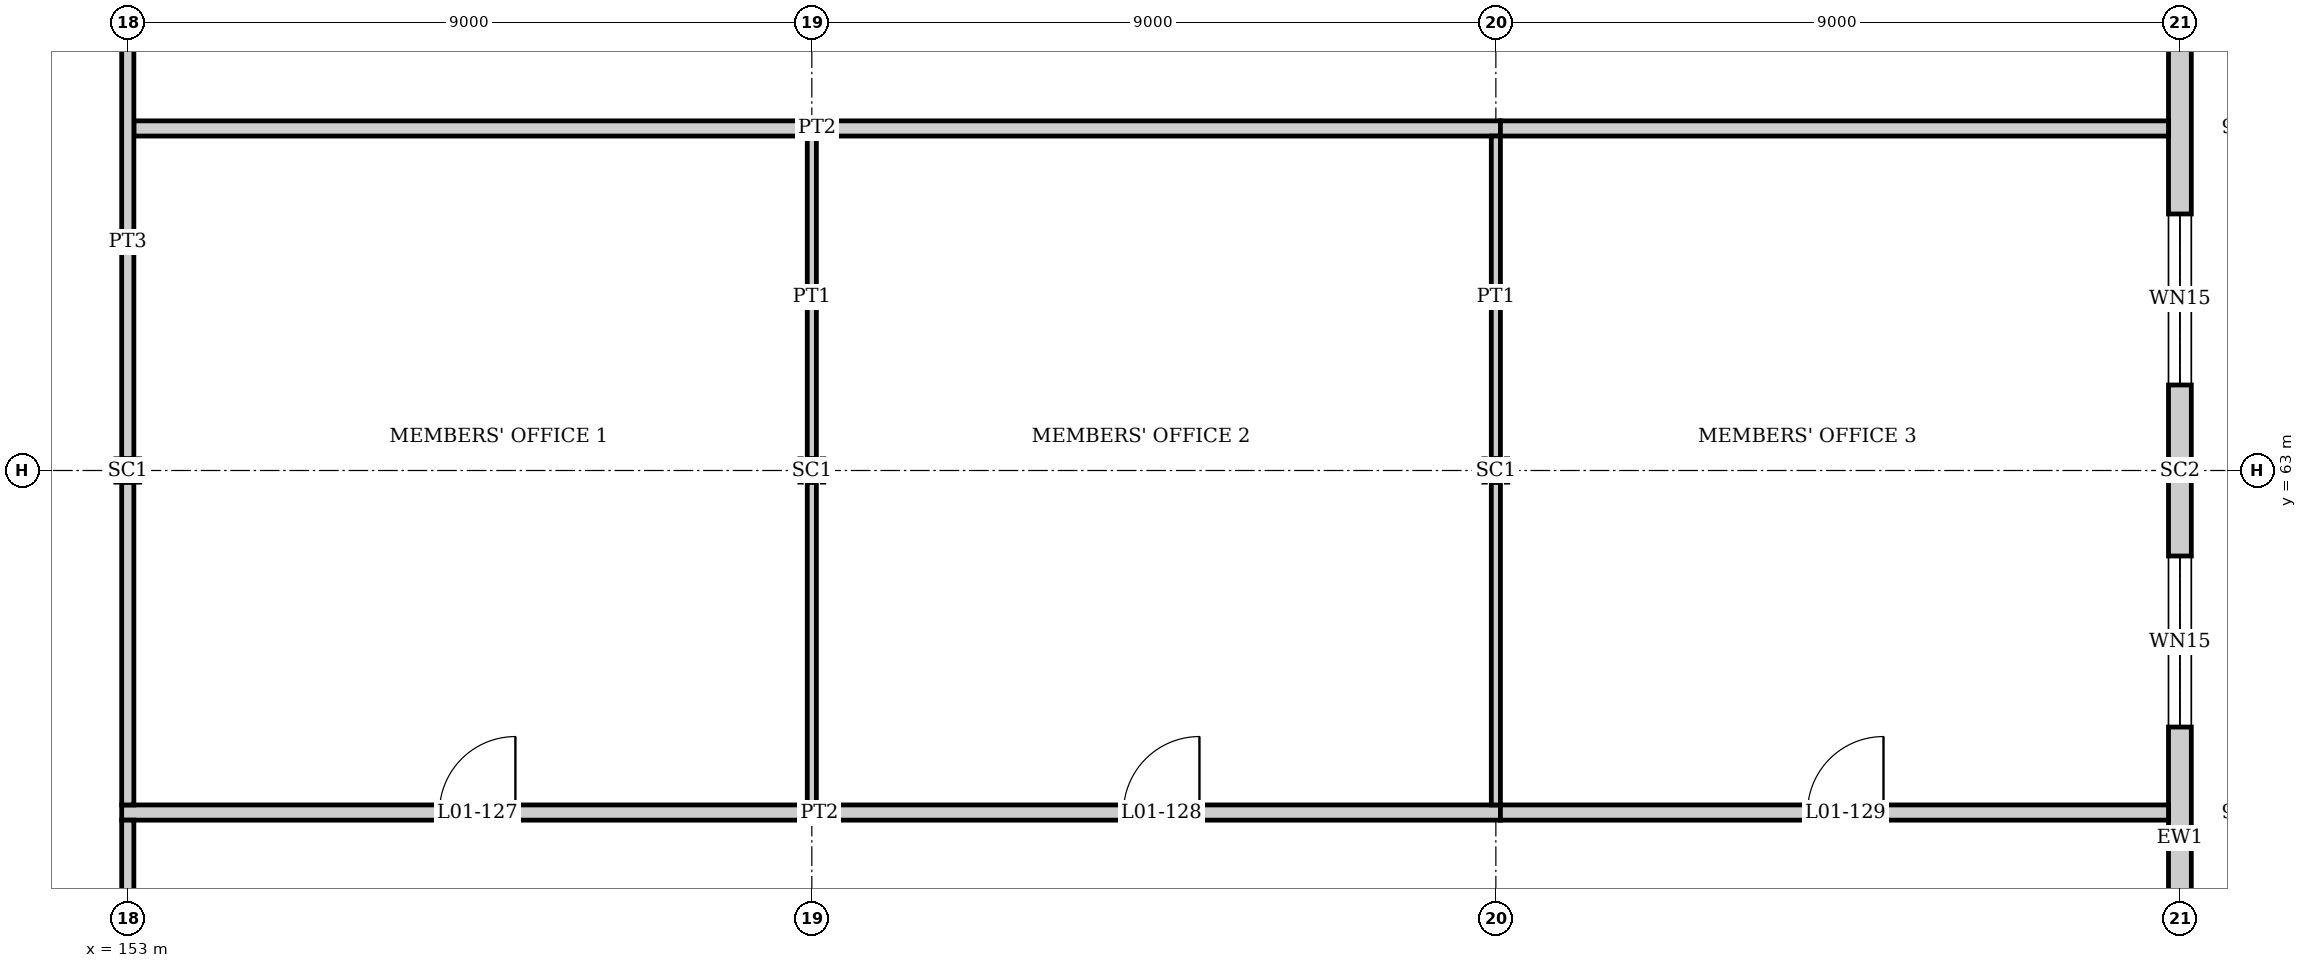
"""IFC4 building model, lengths in metres.
Left out: names, types, materials, properties, quantities, classifications, styles, units other than length and angle.
Written with IfcOpenShell. Run it as: python <this file> out.ifc"""

import sys

from ifc_helpers import new_model, si_unit, direction, frame, frame_2d, origin, origin_2d, place, context, subcontext, project, spatial, rectangle, i_section, extrude, element, fill, save


model = new_model("IFC4")
c1 = context("Model", 3, precision=1e-05, world=origin(), true_north=direction((0.0, 1.0)))
c2 = subcontext(c1, "Body", "Model", "MODEL_VIEW")
j1 = project(units=[si_unit("LENGTHUNIT", "METRE"), si_unit("PLANEANGLEUNIT", "RADIAN")], contexts=[c1])
p1 = place(None, origin())
s1 = spatial("IfcSite", under=j1, at=p1, CompositionType="ELEMENT")
p2 = place(p1, origin())
s2 = spatial("IfcBuilding", under=s1, at=p2, CompositionType="ELEMENT")
p3 = place(p2, frame((0.0, 0.0, 6.0)))
s3 = spatial("IfcBuildingStorey", under=s2, at=p3, CompositionType="ELEMENT", Elevation=6.0)
for number, where, z_axis, x_axis in (
    (1, (153.0, 63.0, 0.0), (0.0, 0.0, 1.0), (0.0, 1.0, 0.0)),
    (2, (162.0, 63.0, 0.0), (0.0, 0.0, 1.0), (0.0, 1.0, 0.0)),
    (3, (171.0, 63.0, 0.0), (0.0, 0.0, 1.0), (0.0, 1.0, 0.0)),
):
    element("IfcColumn", number, at=place(p3, frame(where, z_axis=z_axis, x_axis=x_axis)), inside=s3, PredefinedType="COLUMN", context=c2, shape_type="SweptSolid", body=[
        extrude(i_section(OverallWidth=0.307, OverallDepth=0.315, WebThickness=0.012, FlangeThickness=0.019, at=origin_2d()), origin(), (0.0, 0.0, 1.0), 4.5),
    ])
p4 = place(p3, frame((180.0, 63.0, 0.0), z_axis=(0.0, 0.0, 1.0), x_axis=(0.0, 1.0, 0.0)))
e4 = element("IfcColumn", 4, at=p4, inside=s3, PredefinedType="COLUMN", context=c2, shape_type="SweptSolid", body=[
    extrude(i_section(OverallWidth=0.256, OverallDepth=0.26, WebThickness=0.01, FlangeThickness=0.017, at=origin_2d()), origin(), (0.0, 0.0, 1.0), 4.5),
])
p5 = place(p3, frame((180.0, 54.0, 0.0), z_axis=(0.0, 0.0, 1.0), x_axis=(0.0, 1.0, 0.0)))
e5 = element("IfcWall", 5, at=p5, inside=s3, PredefinedType="SOLIDWALL", context=c2, shape_type="SweptSolid", body=[
    extrude(rectangle(XDim=8.872, YDim=0.3, at=frame_2d((4.436, 0.0))), origin(), (0.0, 0.0, 1.0), 3.947),
])
p6 = place(p5, frame((1.8, 0.0, 0.6)))
e6 = element("IfcOpeningElement", 6, at=p6, cuts=e5, PredefinedType="OPENING", context=c2, shape_type="SweptSolid", body=[
    extrude(rectangle(XDim=0.9, YDim=2.7, at=frame_2d((0.45, 1.35))), frame((0.0, 0.16, 0.0), z_axis=(0.0, -1.0, 0.0), x_axis=(1.0, 0.0, 0.0)), (0.0, 0.0, 1.0), 0.32),
])
p7 = place(p5, frame((5.625, 0.0, 0.9)))
e7 = element("IfcOpeningElement", 7, at=p7, cuts=e5, PredefinedType="OPENING", context=c2, shape_type="SweptSolid", body=[
    extrude(rectangle(XDim=2.25, YDim=1.8, at=frame_2d((1.125, 0.9))), frame((0.0, 0.16, 0.0), z_axis=(0.0, -1.0, 0.0), x_axis=(1.0, 0.0, 0.0)), (0.0, 0.0, 1.0), 0.32),
])
p8 = place(p3, frame((180.0, 63.128, 0.0), z_axis=(0.0, 0.0, 1.0), x_axis=(0.0, 1.0, 0.0)))
e8 = element("IfcWall", 8, at=p8, inside=s3, PredefinedType="SOLIDWALL", context=c2, shape_type="SweptSolid", body=[
    extrude(rectangle(XDim=8.872, YDim=0.3, at=frame_2d((4.436, 0.0))), origin(), (0.0, 0.0, 1.0), 3.947),
])
p9 = place(p8, frame((0.997, 0.0, 0.9)))
e9 = element("IfcOpeningElement", 9, at=p9, cuts=e8, PredefinedType="OPENING", context=c2, shape_type="SweptSolid", body=[
    extrude(rectangle(XDim=2.25, YDim=1.8, at=frame_2d((1.125, 0.9))), frame((0.0, 0.16, 0.0), z_axis=(0.0, -1.0, 0.0), x_axis=(1.0, 0.0, 0.0)), (0.0, 0.0, 1.0), 0.32),
])
p10 = place(p8, frame((6.172, 0.0, 0.6)))
e10 = element("IfcOpeningElement", 10, at=p10, cuts=e8, PredefinedType="OPENING", context=c2, shape_type="SweptSolid", body=[
    extrude(rectangle(XDim=0.9, YDim=2.7, at=frame_2d((0.45, 1.35))), frame((0.0, 0.16, 0.0), z_axis=(0.0, -1.0, 0.0), x_axis=(1.0, 0.0, 0.0)), (0.0, 0.0, 1.0), 0.32),
])
p11 = place(p3, frame((152.92, 58.5, 0.0), z_axis=(0.0, 0.0, 1.0), x_axis=(1.0, 0.0, 0.0)))
e11 = element("IfcWall", 11, at=p11, inside=s3, PredefinedType="PARTITIONING", context=c2, shape_type="SweptSolid", body=[
    extrude(rectangle(XDim=18.14, YDim=0.2, at=frame_2d((9.07, 0.0))), origin(), (0.0, 0.0, 1.0), 3.947),
])
p12 = place(p11, frame((4.18, 0.0, 0.0)))
e12 = element("IfcOpeningElement", 12, at=p12, cuts=e11, PredefinedType="OPENING", context=c2, shape_type="SweptSolid", body=[
    extrude(rectangle(XDim=1.0, YDim=2.1, at=frame_2d((0.5, 1.05))), frame((0.0, 0.11, 0.0), z_axis=(0.0, -1.0, 0.0), x_axis=(1.0, 0.0, 0.0)), (0.0, 0.0, 1.0), 0.22),
])
p13 = place(p11, frame((13.18, 0.0, 0.0)))
e13 = element("IfcOpeningElement", 13, at=p13, cuts=e11, PredefinedType="OPENING", context=c2, shape_type="SweptSolid", body=[
    extrude(rectangle(XDim=1.0, YDim=2.1, at=frame_2d((0.5, 1.05))), frame((0.0, 0.11, 0.0), z_axis=(0.0, -1.0, 0.0), x_axis=(1.0, 0.0, 0.0)), (0.0, 0.0, 1.0), 0.22),
])
p14 = place(p3, frame((171.06, 58.5, 0.0), z_axis=(0.0, 0.0, 1.0), x_axis=(1.0, 0.0, 0.0)))
e14 = element("IfcWall", 14, at=p14, inside=s3, PredefinedType="PARTITIONING", context=c2, shape_type="SweptSolid", body=[
    extrude(rectangle(XDim=8.79, YDim=0.2, at=frame_2d((4.395, 0.0))), origin(), (0.0, 0.0, 1.0), 3.994),
])
p15 = place(p14, frame((4.04, 0.0, 0.0)))
e15 = element("IfcOpeningElement", 15, at=p15, cuts=e14, PredefinedType="OPENING", context=c2, shape_type="SweptSolid", body=[
    extrude(rectangle(XDim=1.0, YDim=2.1, at=frame_2d((0.5, 1.05))), frame((0.0, 0.11, 0.0), z_axis=(0.0, -1.0, 0.0), x_axis=(1.0, 0.0, 0.0)), (0.0, 0.0, 1.0), 0.22),
])
p16 = place(p3, frame((153.08, 67.5, 0.0), z_axis=(0.0, 0.0, 1.0), x_axis=(1.0, 0.0, 0.0)))
e16 = element("IfcWall", 16, at=p16, inside=s3, PredefinedType="PARTITIONING", context=c2, shape_type="SweptSolid", body=[
    extrude(rectangle(XDim=17.98, YDim=0.2, at=frame_2d((8.99, 0.0))), origin(), (0.0, 0.0, 1.0), 3.947),
])
p17 = place(p3, frame((171.06, 67.5, 0.0), z_axis=(0.0, 0.0, 1.0), x_axis=(1.0, 0.0, 0.0)))
e17 = element("IfcWall", 17, at=p17, inside=s3, PredefinedType="PARTITIONING", context=c2, shape_type="SweptSolid", body=[
    extrude(rectangle(XDim=8.79, YDim=0.2, at=frame_2d((4.395, 0.0))), origin(), (0.0, 0.0, 1.0), 3.994),
])
p18 = place(p3, frame((153.0, 54.0, 0.0), z_axis=(0.0, 0.0, 1.0), x_axis=(0.0, 1.0, 0.0)))
e18 = element("IfcWall", 18, at=p18, inside=s3, PredefinedType="PARTITIONING", context=c2, shape_type="SweptSolid", body=[
    extrude(rectangle(XDim=4.4, YDim=0.16, at=frame_2d((2.2, 0.0))), origin(), (0.0, 0.0, 1.0), 3.822),
])
p19 = place(p18, frame((1.35, 0.0, 0.0)))
e19 = element("IfcOpeningElement", 19, at=p19, cuts=e18, PredefinedType="OPENING", context=c2, shape_type="SweptSolid", body=[
    extrude(rectangle(XDim=1.8, YDim=2.1, at=frame_2d((0.9, 1.05))), frame((0.0, 0.09, 0.0), z_axis=(0.0, -1.0, 0.0), x_axis=(1.0, 0.0, 0.0)), (0.0, 0.0, 1.0), 0.18),
])
p20 = place(p3, frame((153.0, 58.6, 0.0), z_axis=(0.0, 0.0, 1.0), x_axis=(0.0, 1.0, 0.0)))
e20 = element("IfcWall", 20, at=p20, inside=s3, PredefinedType="PARTITIONING", context=c2, shape_type="SweptSolid", body=[
    extrude(rectangle(XDim=4.242, YDim=0.16, at=frame_2d((2.121, 0.0))), origin(), (0.0, 0.0, 1.0), 3.994),
])
p21 = place(p3, frame((153.0, 63.157, 0.0), z_axis=(0.0, 0.0, 1.0), x_axis=(0.0, 1.0, 0.0)))
e21 = element("IfcWall", 21, at=p21, inside=s3, PredefinedType="PARTITIONING", context=c2, shape_type="SweptSolid", body=[
    extrude(rectangle(XDim=8.685, YDim=0.16, at=frame_2d((4.343, 0.0))), origin(), (0.0, 0.0, 1.0), 3.947),
])
p22 = place(p21, frame((5.692, 0.0, 0.0)))
e22 = element("IfcOpeningElement", 22, at=p22, cuts=e21, PredefinedType="OPENING", context=c2, shape_type="SweptSolid", body=[
    extrude(rectangle(XDim=1.8, YDim=2.1, at=frame_2d((0.9, 1.05))), frame((0.0, 0.09, 0.0), z_axis=(0.0, -1.0, 0.0), x_axis=(1.0, 0.0, 0.0)), (0.0, 0.0, 1.0), 0.18),
])
for number, where, z_axis, x_axis in (
    (23, (162.0, 58.6, 0.0), (0.0, 0.0, 1.0), (0.0, 1.0, 0.0)),
    (24, (162.0, 63.157, 0.0), (0.0, 0.0, 1.0), (0.0, 1.0, 0.0)),
):
    element("IfcWall", number, at=place(p3, frame(where, z_axis=z_axis, x_axis=x_axis)), inside=s3, PredefinedType="PARTITIONING", context=c2, shape_type="SweptSolid", body=[
        extrude(rectangle(XDim=4.242, YDim=0.12, at=frame_2d((2.121, 0.0))), origin(), (0.0, 0.0, 1.0), 3.947),
    ])
for number, where, z_axis, x_axis in (
    (25, (171.0, 58.6, 0.0), (0.0, 0.0, 1.0), (0.0, 1.0, 0.0)),
    (26, (171.0, 63.157, 0.0), (0.0, 0.0, 1.0), (0.0, 1.0, 0.0)),
):
    element("IfcWall", number, at=place(p3, frame(where, z_axis=z_axis, x_axis=x_axis)), inside=s3, PredefinedType="PARTITIONING", context=c2, shape_type="SweptSolid", body=[
        extrude(rectangle(XDim=4.242, YDim=0.12, at=frame_2d((2.121, 0.0))), origin(), (0.0, 0.0, 1.0), 3.994),
    ])
p23 = place(p7, origin())
e27 = element("IfcWindow", 27, at=p23, inside=s3, PartitioningType="SINGLE_PANEL", PredefinedType="WINDOW", context=c2, shape_type="SweptSolid", body=[
    extrude(rectangle(XDim=2.25, YDim=1.8, at=frame_2d((1.125, 0.9))), frame((0.0, 0.03, 0.0), z_axis=(0.0, -1.0, 0.0), x_axis=(1.0, 0.0, 0.0)), (0.0, 0.0, 1.0), 0.06),
])
fill(e7, e27)
p24 = place(p9, origin())
e28 = element("IfcWindow", 28, at=p24, inside=s3, PartitioningType="SINGLE_PANEL", PredefinedType="WINDOW", context=c2, shape_type="SweptSolid", body=[
    extrude(rectangle(XDim=2.25, YDim=1.8, at=frame_2d((1.125, 0.9))), frame((0.0, 0.03, 0.0), z_axis=(0.0, -1.0, 0.0), x_axis=(1.0, 0.0, 0.0)), (0.0, 0.0, 1.0), 0.06),
])
fill(e9, e28)
p25 = place(p12, origin())
e29 = element("IfcDoor", 29, at=p25, inside=s3, OperationType="SINGLE_SWING_RIGHT", PredefinedType="DOOR", context=c2, shape_type="SweptSolid", body=[
    extrude(rectangle(XDim=1.0, YDim=2.1, at=frame_2d((0.5, 1.05))), frame((0.0, 0.025, 0.0), z_axis=(0.0, -1.0, 0.0), x_axis=(1.0, 0.0, 0.0)), (0.0, 0.0, 1.0), 0.05),
])
fill(e12, e29)
p26 = place(p13, origin())
e30 = element("IfcDoor", 30, at=p26, inside=s3, OperationType="SINGLE_SWING_RIGHT", PredefinedType="DOOR", context=c2, shape_type="SweptSolid", body=[
    extrude(rectangle(XDim=1.0, YDim=2.1, at=frame_2d((0.5, 1.05))), frame((0.0, 0.025, 0.0), z_axis=(0.0, -1.0, 0.0), x_axis=(1.0, 0.0, 0.0)), (0.0, 0.0, 1.0), 0.05),
])
fill(e13, e30)
p27 = place(p15, origin())
e31 = element("IfcDoor", 31, at=p27, inside=s3, OperationType="SINGLE_SWING_RIGHT", PredefinedType="DOOR", context=c2, shape_type="SweptSolid", body=[
    extrude(rectangle(XDim=1.0, YDim=2.1, at=frame_2d((0.5, 1.05))), frame((0.0, 0.025, 0.0), z_axis=(0.0, -1.0, 0.0), x_axis=(1.0, 0.0, 0.0)), (0.0, 0.0, 1.0), 0.05),
])
fill(e15, e31)
save(model, sys.argv[1])
